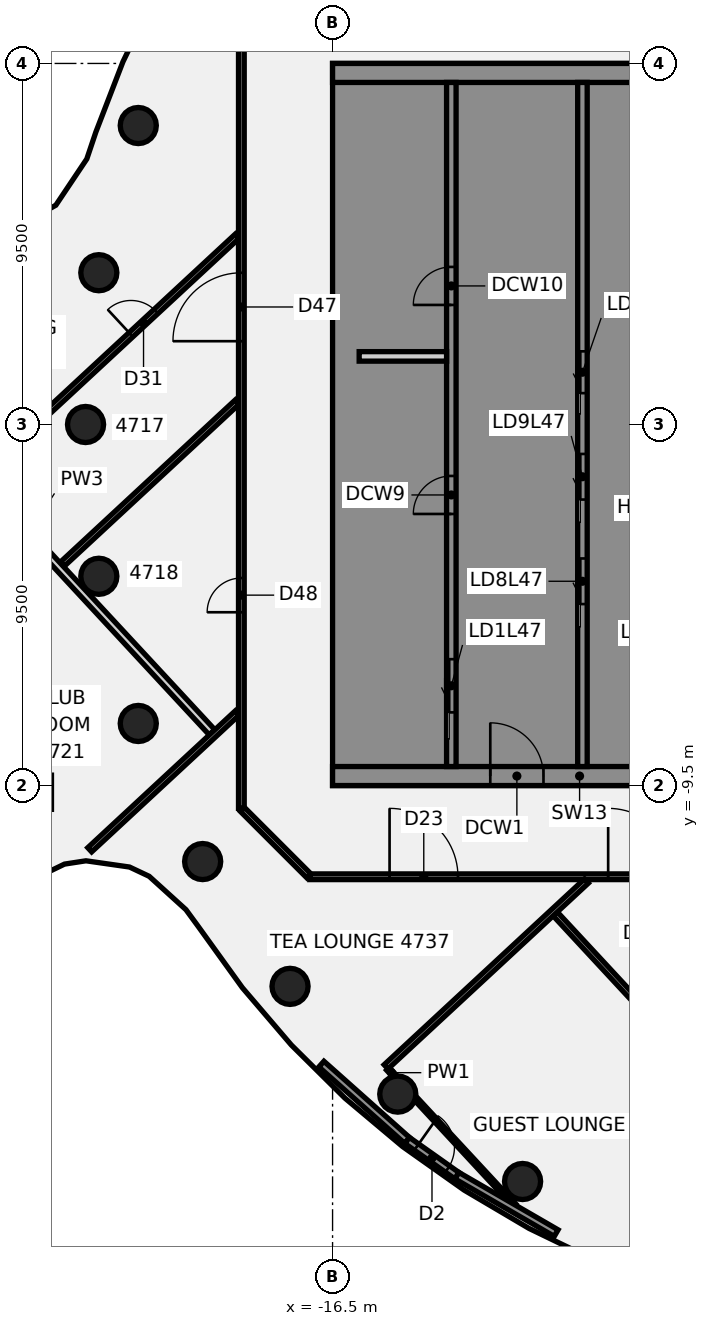
"""IFC4 building model, lengths in metres.
Left out: names, types, materials, properties, quantities, classifications, styles, units other than length and angle.
Written with IfcOpenShell. Run it as: python <this file> out.ifc"""

import sys

from ifc_helpers import new_model, si_unit, direction, frame, frame_2d, origin, origin_2d, place, context, subcontext, project, spatial, polyline, rectangle, circle, outline, extrude, element, fill, save


model = new_model("IFC4")
c1 = context("Model", 3, precision=1e-05, world=origin(), true_north=direction((0.0, 1.0)))
c2 = subcontext(c1, "Body", "Model", "MODEL_VIEW")
j1 = project(units=[si_unit("LENGTHUNIT", "METRE"), si_unit("PLANEANGLEUNIT", "RADIAN")], contexts=[c1])
p1 = place(None, origin())
s1 = spatial("IfcSite", under=j1, at=p1, CompositionType="ELEMENT")
p2 = place(p1, origin())
s2 = spatial("IfcBuilding", under=s1, at=p2, CompositionType="ELEMENT")
p3 = place(p2, frame((0.0, 0.0, 189.7)))
s3 = spatial("IfcBuildingStorey", under=s2, at=p3, CompositionType="ELEMENT", Elevation=189.7)
for number, where, z_axis, x_axis in (
    (1, (-21.613, 7.866, -0.14), (0.0, 0.0, 1.0), (1.0, 0.0, 0.0)),
    (2, (-22.651, 3.994, -0.14), (0.0, 0.0, 1.0), (1.0, 0.0, 0.0)),
    (3, (-23.0, 0.0, -0.14), (0.0, 0.0, 1.0), (1.0, 0.0, 0.0)),
    (4, (-22.651, -3.994, -0.14), (0.0, 0.0, 1.0), (1.0, 0.0, 0.0)),
    (5, (-21.613, -7.866, -0.14), (0.0, 0.0, 1.0), (1.0, 0.0, 0.0)),
    (6, (-19.919, -11.5, -0.14), (0.0, 0.0, 1.0), (1.0, 0.0, 0.0)),
    (7, (-17.619, -14.784, -0.14), (0.0, 0.0, 1.0), (1.0, 0.0, 0.0)),
    (8, (-14.784, -17.619, -0.14), (0.0, 0.0, 1.0), (1.0, 0.0, 0.0)),
    (9, (-11.5, -19.919, -0.14), (0.0, 0.0, 1.0), (1.0, 0.0, 0.0)),
):
    element("IfcColumn", number, at=place(p3, frame(where, z_axis=z_axis, x_axis=x_axis)), inside=s3, PredefinedType="COLUMN", context=c2, shape_type="SweptSolid", body=[
        extrude(circle(Radius=0.475, at=origin_2d()), origin(), (0.0, 0.0, 1.0), 3.6),
    ])
p4 = place(p3, frame((-24.347, -9.677, -0.139), z_axis=(0.049004711131, -0.011386986819, 0.99873363557), x_axis=(-0.679260584893, 0.732712476675, 0.041683142108)))
e10 = element("IfcColumn", 10, at=p4, inside=s3, PredefinedType="COLUMN", context=c2, shape_type="SweptSolid", body=[
    extrude(rectangle(XDim=0.9, YDim=0.9, at=origin_2d()), origin(), (0.0, 0.0, 1.0), 3.602),
])
p5 = place(p3, frame((-29.342, 2.328, 0.0), z_axis=(0.0, 0.0, 1.0), x_axis=(0.679974811844, -0.73323547054, 0.0)))
e11 = element("IfcWall", 11, at=p5, inside=s3, PredefinedType="PARTITIONING", context=c2, shape_type="SweptSolid", body=[
    extrude(rectangle(XDim=14.219, YDim=0.2, at=frame_2d((7.11, 0.0))), origin(), (0.0, 0.0, 1.0), 2.864),
])
p6 = place(p5, frame((5.8, 0.0, 0.0)))
e12 = element("IfcOpeningElement", 12, at=p6, cuts=e11, PredefinedType="OPENING", context=c2, shape_type="SweptSolid", body=[
    extrude(rectangle(XDim=1.4, YDim=2.1, at=frame_2d((0.7, 1.05))), frame((0.0, 0.11, 0.0), z_axis=(0.0, -1.0, 0.0), x_axis=(1.0, 0.0, 0.0)), (0.0, 0.0, 1.0), 0.22),
])
p7 = place(p3, frame((-15.041, -16.956, 0.0), z_axis=(0.0, 0.0, 1.0), x_axis=(0.679895310154, -0.733309189381, 0.0)))
e13 = element("IfcWall", 13, at=p7, inside=s3, PredefinedType="PARTITIONING", context=c2, shape_type="SweptSolid", body=[
    extrude(rectangle(XDim=0.27, YDim=0.1, at=frame_2d((0.135, 0.0))), origin(), (0.0, 0.0, 1.0), 2.864),
])
p8 = place(p3, frame((-14.328, -17.725, 0.0), z_axis=(0.0, 0.0, 1.0), x_axis=(0.679978080858, -0.733232438966, 0.0)))
e14 = element("IfcWall", 14, at=p8, inside=s3, PredefinedType="PARTITIONING", context=c2, shape_type="SweptSolid", body=[
    extrude(rectangle(XDim=3.842, YDim=0.1, at=frame_2d((1.921, 0.0))), origin(), (0.0, 0.0, 1.0), 2.864),
])
p9 = place(p3, frame((-10.638, -12.881, 0.0), z_axis=(0.0, 0.0, 1.0), x_axis=(0.679925356206, -0.733281330724, 0.0)))
e15 = element("IfcWall", 15, at=p9, inside=s3, PredefinedType="PARTITIONING", context=c2, shape_type="SweptSolid", body=[
    extrude(rectangle(XDim=17.639, YDim=0.15, at=frame_2d((8.82, 0.0))), origin(), (0.0, 0.0, 1.0), 2.864),
])
p10 = place(p9, frame((7.87, 0.0, 0.0)))
e16 = element("IfcOpeningElement", 16, at=p10, cuts=e15, PredefinedType="OPENING", context=c2, shape_type="SweptSolid", body=[
    extrude(rectangle(XDim=1.8, YDim=2.1, at=frame_2d((0.9, 1.05))), frame((0.0, 0.085, 0.0), z_axis=(0.0, -1.0, 0.0), x_axis=(1.0, 0.0, 0.0)), (0.0, 0.0, 1.0), 0.17),
])
p11 = place(p3, frame((-18.872, -10.128, 0.0), z_axis=(0.0, 0.0, 1.0), x_axis=(0.707106781187, -0.707106781187, 0.0)))
e17 = element("IfcWall", 17, at=p11, inside=s3, PredefinedType="PARTITIONING", context=c2, shape_type="SweptSolid", body=[
    extrude(rectangle(XDim=2.465, YDim=0.15, at=frame_2d((1.232, 0.0))), origin(), (0.0, 0.0, 1.0), 2.864),
])
p12 = place(p3, frame((-17.1, -11.9, 0.0), z_axis=(0.0, 0.0, 1.0), x_axis=(1.0, 0.0, 0.0)))
e18 = element("IfcWall", 18, at=p12, inside=s3, PredefinedType="PARTITIONING", context=c2, shape_type="SweptSolid", body=[
    extrude(rectangle(XDim=34.165, YDim=0.15, at=frame_2d((17.083, 0.0))), origin(), (0.0, 0.0, 1.0), 2.864),
])
p13 = place(p12, frame((7.852, 0.0, 0.0)))
e19 = element("IfcOpeningElement", 19, at=p13, cuts=e18, PredefinedType="OPENING", context=c2, shape_type="SweptSolid", body=[
    extrude(rectangle(XDim=1.8, YDim=2.1, at=frame_2d((0.9, 1.05))), frame((0.0, 0.085, 0.0), z_axis=(0.0, -1.0, 0.0), x_axis=(1.0, 0.0, 0.0)), (0.0, 0.0, 1.0), 0.17),
])
p14 = place(p12, frame((2.1, 0.0, 0.0)))
e20 = element("IfcOpeningElement", 20, at=p14, cuts=e18, PredefinedType="OPENING", context=c2, shape_type="SweptSolid", body=[
    extrude(rectangle(XDim=1.8, YDim=2.1, at=frame_2d((0.9, 1.05))), frame((0.0, 0.085, 0.0), z_axis=(0.0, -1.0, 0.0), x_axis=(1.0, 0.0, 0.0)), (0.0, 0.0, 1.0), 0.17),
])
p15 = place(p12, frame((25.149, 0.0, 0.0)))
e21 = element("IfcOpeningElement", 21, at=p15, cuts=e18, PredefinedType="OPENING", context=c2, shape_type="SweptSolid", body=[
    extrude(rectangle(XDim=1.8, YDim=2.1, at=frame_2d((0.9, 1.05))), frame((0.0, 0.085, 0.0), z_axis=(0.0, -1.0, 0.0), x_axis=(1.0, 0.0, 0.0)), (0.0, 0.0, 1.0), 0.17),
])
p16 = place(p3, frame((-25.801, -1.342, 0.0), z_axis=(0.0, 0.0, 1.0), x_axis=(0.733307567505, 0.679897059444, 0.0)))
e22 = element("IfcWall", 22, at=p16, inside=s3, PredefinedType="PARTITIONING", context=c2, shape_type="SweptSolid", body=[
    extrude(rectangle(XDim=9.265, YDim=0.15, at=frame_2d((4.633, 0.0))), origin(), (0.0, 0.0, 1.0), 2.864),
])
p17 = place(p16, frame((5.45, 0.0, 0.0)))
e23 = element("IfcOpeningElement", 23, at=p17, cuts=e22, PredefinedType="OPENING", context=c2, shape_type="SweptSolid", body=[
    extrude(rectangle(XDim=0.9, YDim=2.1, at=frame_2d((0.45, 1.05))), frame((0.0, 0.085, 0.0), z_axis=(0.0, -1.0, 0.0), x_axis=(1.0, 0.0, 0.0)), (0.0, 0.0, 1.0), 0.17),
])
p18 = place(p3, frame((-23.611, -3.675, 0.0), z_axis=(0.0, 0.0, 1.0), x_axis=(0.73335133344, 0.679849852351, 0.0)))
e24 = element("IfcWall", 24, at=p18, inside=s3, PredefinedType="PARTITIONING", context=c2, shape_type="SweptSolid", body=[
    extrude(rectangle(XDim=6.279, YDim=0.15, at=frame_2d((3.14, 0.0))), origin(), (0.0, 0.0, 1.0), 2.864),
])
p19 = place(p3, frame((-22.89, -11.19, 0.0), z_axis=(0.0, 0.0, 1.0), x_axis=(0.733248099132, 0.679961193833, 0.0)))
e25 = element("IfcWall", 25, at=p19, inside=s3, PredefinedType="PARTITIONING", context=c2, shape_type="SweptSolid", body=[
    extrude(rectangle(XDim=5.296, YDim=0.15, at=frame_2d((2.648, 0.0))), origin(), (0.0, 0.0, 1.0), 2.864),
])
p20 = place(p3, frame((-15.092, -16.901, 0.0), z_axis=(0.0, 0.0, 1.0), x_axis=(0.733371254751, 0.67982836268, 0.0)))
e26 = element("IfcWall", 26, at=p20, inside=s3, PredefinedType="PARTITIONING", context=c2, shape_type="SweptSolid", body=[
    extrude(rectangle(XDim=7.191, YDim=0.15, at=frame_2d((3.595, 0.0))), origin(), (0.0, 0.0, 1.0), 2.864),
])
p21 = place(p3, frame((-18.9, -10.1, 0.0), z_axis=(0.0, 0.0, 1.0), x_axis=(0.0, 1.0, 0.0)))
e27 = element("IfcWall", 27, at=p21, inside=s3, PredefinedType="PARTITIONING", context=c2, shape_type="SweptSolid", body=[
    extrude(rectangle(XDim=20.2, YDim=0.15, at=frame_2d((10.1, 0.0))), origin(), (0.0, 0.0, 1.0), 2.864),
])
p22 = place(p21, frame((12.292, 0.0, 0.0)))
e28 = element("IfcOpeningElement", 28, at=p22, cuts=e27, PredefinedType="OPENING", context=c2, shape_type="SweptSolid", body=[
    extrude(rectangle(XDim=1.8, YDim=2.1, at=frame_2d((0.9, 1.05))), frame((0.0, 0.085, 0.0), z_axis=(0.0, -1.0, 0.0), x_axis=(1.0, 0.0, 0.0)), (0.0, 0.0, 1.0), 0.17),
])
p23 = place(p21, frame((5.16, 0.0, 0.0)))
e29 = element("IfcOpeningElement", 29, at=p23, cuts=e27, PredefinedType="OPENING", context=c2, shape_type="SweptSolid", body=[
    extrude(rectangle(XDim=0.9, YDim=2.1, at=frame_2d((0.45, 1.05))), frame((0.0, 0.085, 0.0), z_axis=(0.0, -1.0, 0.0), x_axis=(1.0, 0.0, 0.0)), (0.0, 0.0, 1.0), 0.17),
])
p24 = place(p3, frame((-16.794, -16.83, 0.0), z_axis=(0.0, 0.0, 1.0), x_axis=(0.746918793399, -0.664915269841, 0.0)))
e30 = element("IfcWall", 30, at=p24, inside=s3, PredefinedType="SOLIDWALL", context=c2, shape_type="SweptSolid", body=[
    extrude(rectangle(XDim=3.022, YDim=0.2, at=frame_2d((1.511, 0.0))), origin(), (0.0, 0.0, 1.0), 3.46),
])
p25 = place(p3, frame((-13.231, -19.763, 0.0), z_axis=(0.0, 0.0, 1.0), x_axis=(0.865619895442, -0.500701704226, 0.0)))
e31 = element("IfcWall", 31, at=p25, inside=s3, PredefinedType="SOLIDWALL", context=c2, shape_type="SweptSolid", body=[
    extrude(rectangle(XDim=3.021, YDim=0.2, at=frame_2d((1.51, 0.0))), origin(), (0.0, 0.0, 1.0), 3.46),
])
p26 = place(p3, frame((-14.537, -18.839, 0.0), z_axis=(0.0, 0.0, 1.0), x_axis=(0.816282280001, -0.577653217212, 0.0)))
e32 = element("IfcWall", 32, at=p26, inside=s3, PredefinedType="SOLIDWALL", context=c2, shape_type="SweptSolid", body=[
    extrude(rectangle(XDim=1.6, YDim=0.2, at=frame_2d((0.8, 0.0))), origin(), (0.0, 0.0, 1.0), 3.46),
])
p27 = place(p26, frame((0.3, 0.0, 0.0)))
e33 = element("IfcOpeningElement", 33, at=p27, cuts=e32, PredefinedType="OPENING", context=c2, shape_type="SweptSolid", body=[
    extrude(rectangle(XDim=1.0, YDim=2.4, at=frame_2d((0.5, 1.2))), frame((0.0, 0.11, 0.0), z_axis=(0.0, -1.0, 0.0), x_axis=(1.0, 0.0, 0.0)), (0.0, 0.0, 1.0), 0.22),
])
p28 = place(p3, frame((-16.5, -9.25, 0.0), z_axis=(0.0, 0.0, 1.0), x_axis=(1.0, 0.0, 0.0)))
e34 = element("IfcWall", 34, at=p28, inside=s3, PredefinedType="SHEAR", context=c2, shape_type="SweptSolid", body=[
    extrude(rectangle(XDim=13.0, YDim=0.5, at=frame_2d((6.5, 0.0))), origin(), (0.0, 0.0, 1.0), 3.46),
])
p29 = place(p28, frame((4.15, 0.0, 0.0)))
e35 = element("IfcOpeningElement", 35, at=p29, cuts=e34, PredefinedType="OPENING", context=c2, shape_type="SweptSolid", body=[
    extrude(rectangle(XDim=1.4, YDim=2.1, at=frame_2d((0.7, 1.05))), frame((0.0, 0.26, 0.0), z_axis=(0.0, -1.0, 0.0), x_axis=(1.0, 0.0, 0.0)), (0.0, 0.0, 1.0), 0.52),
])
p30 = place(p28, frame((10.125, 0.0, 0.0)))
e36 = element("IfcOpeningElement", 36, at=p30, cuts=e34, PredefinedType="OPENING", context=c2, shape_type="SweptSolid", body=[
    extrude(rectangle(XDim=1.4, YDim=2.1, at=frame_2d((0.7, 1.05))), frame((0.0, 0.26, 0.0), z_axis=(0.0, -1.0, 0.0), x_axis=(1.0, 0.0, 0.0)), (0.0, 0.0, 1.0), 0.52),
])
p31 = place(p3, origin())
e37 = element("IfcWall", 37, at=p31, inside=s3, PredefinedType="SHEAR", context=c2, shape_type="SweptSolid", body=[
    extrude(outline(polyline([(-13.5, -8.125), (-16.0, -8.125), (-16.0, -5.625), (-13.5, -5.625), (-13.5, -5.375), (-16.0, -5.375), (-16.0, 5.375), (-13.5, 5.375), (-13.5, 5.625), (-16.0, 5.625), (-16.0, 8.125), (-13.5, 8.125), (-13.5, 9.0), (-16.0, 9.0), (-16.5, 9.0), (-16.5, -9.0), (-16.0, -9.0), (-13.5, -9.0), (-13.5, -8.125)])), origin(), (0.0, 0.0, 1.0), 3.46),
])
p32 = place(p3, frame((-16.5, 9.25, 0.0), z_axis=(0.0, 0.0, 1.0), x_axis=(1.0, 0.0, 0.0)))
e38 = element("IfcWall", 38, at=p32, inside=s3, PredefinedType="SHEAR", context=c2, shape_type="SweptSolid", body=[
    extrude(rectangle(XDim=13.0, YDim=0.5, at=frame_2d((6.5, 0.0))), origin(), (0.0, 0.0, 1.0), 3.46),
])
p33 = place(p3, origin())
e39 = element("IfcWall", 39, at=p33, inside=s3, PredefinedType="SHEAR", context=c2, shape_type="SweptSolid", body=[
    extrude(outline(polyline([(-9.8, -5.375), (-9.8, -5.625), (-7.5, -5.625), (-7.25, -5.625), (-7.25, 9.0), (-7.5, 9.0), (-9.8, 9.0), (-9.8, 8.125), (-7.5, 8.125), (-7.5, 5.625), (-9.8, 5.625), (-9.8, 5.375), (-7.5, 5.375), (-7.5, 2.875), (-9.8, 2.875), (-9.8, 2.625), (-7.5, 2.625), (-7.5, 0.125), (-9.8, 0.125), (-9.8, -0.125), (-7.5, -0.125), (-7.5, -2.625), (-9.8, -2.625), (-9.8, -2.875), (-7.5, -2.875), (-7.5, -5.375), (-9.8, -5.375)])), origin(), (0.0, 0.0, 1.0), 3.46),
])
p34 = place(p3, origin())
e40 = element("IfcWall", 40, at=p34, inside=s3, PredefinedType="SHEAR", context=c2, shape_type="SweptSolid", body=[
    extrude(outline(polyline([(-7.5, -8.125), (-9.55, -8.125), (-9.55, -5.625), (-9.8, -5.625), (-9.8, -8.125), (-9.8, -9.0), (-7.5, -9.0), (-7.5, -8.125)])), origin(), (0.0, 0.0, 1.0), 3.46),
])
p35 = place(p3, frame((-13.375, -9.0, 0.0), z_axis=(0.0, 0.0, 1.0), x_axis=(0.0, 1.0, 0.0)))
e41 = element("IfcWall", 41, at=p35, inside=s3, PredefinedType="SHEAR", context=c2, shape_type="SweptSolid", body=[
    extrude(rectangle(XDim=18.0, YDim=0.25, at=frame_2d((9.0, 0.0))), origin(), (0.0, 0.0, 1.0), 3.46),
])
p36 = place(p35, frame((1.425, 0.0, 0.0)))
e42 = element("IfcOpeningElement", 42, at=p36, cuts=e41, PredefinedType="OPENING", context=c2, shape_type="SweptSolid", body=[
    extrude(rectangle(XDim=1.4, YDim=2.1, at=frame_2d((0.7, 1.05))), frame((0.0, 0.135, 0.0), z_axis=(0.0, -1.0, 0.0), x_axis=(1.0, 0.0, 0.0)), (0.0, 0.0, 1.0), 0.27),
])
p37 = place(p35, frame((6.646, 0.0, 0.0)))
e43 = element("IfcOpeningElement", 43, at=p37, cuts=e41, PredefinedType="OPENING", context=c2, shape_type="SweptSolid", body=[
    extrude(rectangle(XDim=1.0, YDim=2.1, at=frame_2d((0.5, 1.05))), frame((0.0, 0.135, 0.0), z_axis=(0.0, -1.0, 0.0), x_axis=(1.0, 0.0, 0.0)), (0.0, 0.0, 1.0), 0.27),
])
p38 = place(p35, frame((12.146, 0.0, 0.0)))
e44 = element("IfcOpeningElement", 44, at=p38, cuts=e41, PredefinedType="OPENING", context=c2, shape_type="SweptSolid", body=[
    extrude(rectangle(XDim=1.0, YDim=2.1, at=frame_2d((0.5, 1.05))), frame((0.0, 0.135, 0.0), z_axis=(0.0, -1.0, 0.0), x_axis=(1.0, 0.0, 0.0)), (0.0, 0.0, 1.0), 0.27),
])
p39 = place(p3, frame((-9.925, -9.0, 0.0), z_axis=(0.0, 0.0, 1.0), x_axis=(0.0, 1.0, 0.0)))
e45 = element("IfcWall", 45, at=p39, inside=s3, PredefinedType="SHEAR", context=c2, shape_type="SweptSolid", body=[
    extrude(rectangle(XDim=18.0, YDim=0.25, at=frame_2d((9.0, 0.0))), origin(), (0.0, 0.0, 1.0), 3.46),
])
p40 = place(p39, frame((4.275, 0.0, 0.0)))
e46 = element("IfcOpeningElement", 46, at=p40, cuts=e45, PredefinedType="OPENING", context=c2, shape_type="SweptSolid", body=[
    extrude(rectangle(XDim=1.2, YDim=2.1, at=frame_2d((0.6, 1.05))), frame((0.0, 0.135, 0.0), z_axis=(0.0, -1.0, 0.0), x_axis=(1.0, 0.0, 0.0)), (0.0, 0.0, 1.0), 0.27),
])
p41 = place(p39, frame((7.025, 0.0, 0.0)))
e47 = element("IfcOpeningElement", 47, at=p41, cuts=e45, PredefinedType="OPENING", context=c2, shape_type="SweptSolid", body=[
    extrude(rectangle(XDim=1.2, YDim=2.1, at=frame_2d((0.6, 1.05))), frame((0.0, 0.135, 0.0), z_axis=(0.0, -1.0, 0.0), x_axis=(1.0, 0.0, 0.0)), (0.0, 0.0, 1.0), 0.27),
])
p42 = place(p39, frame((9.825, 0.0, 0.0)))
e48 = element("IfcOpeningElement", 48, at=p42, cuts=e45, PredefinedType="OPENING", context=c2, shape_type="SweptSolid", body=[
    extrude(rectangle(XDim=1.1, YDim=2.1, at=frame_2d((0.55, 1.05))), frame((0.0, 0.135, 0.0), z_axis=(0.0, -1.0, 0.0), x_axis=(1.0, 0.0, 0.0)), (0.0, 0.0, 1.0), 0.27),
])
p43 = place(p3, frame((-15.8, 1.792, 0.0), z_axis=(0.0, 0.0, 1.0), x_axis=(1.0, 0.0, 0.0)))
e49 = element("IfcWall", 49, at=p43, inside=s3, PredefinedType="PARTITIONING", context=c2, shape_type="SweptSolid", body=[
    extrude(rectangle(XDim=2.3, YDim=0.25, at=frame_2d((1.15, 0.0))), origin(), (0.0, 0.0, 1.0), 3.46),
])
p44 = place(p13, origin())
e50 = element("IfcDoor", 50, at=p44, inside=s3, OperationType="DOUBLE_DOOR_SINGLE_SWING", PredefinedType="DOOR", context=c2, shape_type="SweptSolid", body=[
    extrude(rectangle(XDim=1.8, YDim=2.1, at=frame_2d((0.9, 1.05))), frame((0.0, 0.025, 0.0), z_axis=(0.0, -1.0, 0.0), x_axis=(1.0, 0.0, 0.0)), (0.0, 0.0, 1.0), 0.05),
])
fill(e19, e50)
p45 = place(p14, frame((1.8, 0.0, 0.0), z_axis=(0.0, 0.0, 1.0), x_axis=(-1.0, 0.0, 0.0)))
e51 = element("IfcDoor", 51, at=p45, inside=s3, OperationType="DOUBLE_DOOR_SINGLE_SWING", PredefinedType="DOOR", context=c2, shape_type="SweptSolid", body=[
    extrude(rectangle(XDim=1.8, YDim=2.1, at=frame_2d((0.9, 1.05))), frame((0.0, 0.025, 0.0), z_axis=(0.0, -1.0, 0.0), x_axis=(1.0, 0.0, 0.0)), (0.0, 0.0, 1.0), 0.05),
])
fill(e20, e51)
p46 = place(p17, origin())
e52 = element("IfcDoor", 52, at=p46, inside=s3, OperationType="SINGLE_SWING_LEFT", PredefinedType="DOOR", context=c2, shape_type="SweptSolid", body=[
    extrude(rectangle(XDim=0.9, YDim=2.1, at=frame_2d((0.45, 1.05))), frame((0.0, 0.025, 0.0), z_axis=(0.0, -1.0, 0.0), x_axis=(1.0, 0.0, 0.0)), (0.0, 0.0, 1.0), 0.05),
])
fill(e23, e52)
p47 = place(p22, frame((1.8, 0.0, 0.0), z_axis=(0.0, 0.0, 1.0), x_axis=(-1.0, 0.0, 0.0)))
e53 = element("IfcDoor", 53, at=p47, inside=s3, OperationType="DOUBLE_DOOR_SINGLE_SWING", PredefinedType="DOOR", context=c2, shape_type="SweptSolid", body=[
    extrude(rectangle(XDim=1.8, YDim=2.1, at=frame_2d((0.9, 1.05))), frame((0.0, 0.025, 0.0), z_axis=(0.0, -1.0, 0.0), x_axis=(1.0, 0.0, 0.0)), (0.0, 0.0, 1.0), 0.05),
])
fill(e28, e53)
p48 = place(p23, origin())
e54 = element("IfcDoor", 54, at=p48, inside=s3, OperationType="SINGLE_SWING_RIGHT", PredefinedType="DOOR", context=c2, shape_type="SweptSolid", body=[
    extrude(rectangle(XDim=0.9, YDim=2.1, at=frame_2d((0.45, 1.05))), frame((0.0, 0.025, 0.0), z_axis=(0.0, -1.0, 0.0), x_axis=(1.0, 0.0, 0.0)), (0.0, 0.0, 1.0), 0.05),
])
fill(e29, e54)
p49 = place(p27, origin())
e55 = element("IfcDoor", 55, at=p49, inside=s3, OperationType="SINGLE_SWING_LEFT", PredefinedType="DOOR", context=c2, shape_type="SweptSolid", body=[
    extrude(rectangle(XDim=1.0, YDim=2.4, at=frame_2d((0.5, 1.2))), frame((0.0, 0.025, 0.0), z_axis=(0.0, -1.0, 0.0), x_axis=(1.0, 0.0, 0.0)), (0.0, 0.0, 1.0), 0.05),
])
fill(e33, e55)
p50 = place(p29, origin())
e56 = element("IfcDoor", 56, at=p50, inside=s3, OperationType="SINGLE_SWING_LEFT", PredefinedType="DOOR", context=c2, shape_type="SweptSolid", body=[
    extrude(rectangle(XDim=1.4, YDim=2.1, at=frame_2d((0.7, 1.05))), frame((0.0, 0.025, 0.0), z_axis=(0.0, -1.0, 0.0), x_axis=(1.0, 0.0, 0.0)), (0.0, 0.0, 1.0), 0.05),
])
fill(e35, e56)
p51 = place(p36, origin())
e57 = element("IfcDoor", 57, at=p51, inside=s3, OperationType="SLIDING_TO_LEFT", PredefinedType="DOOR", context=c2, shape_type="SweptSolid", body=[
    extrude(rectangle(XDim=1.4, YDim=2.1, at=frame_2d((0.7, 1.05))), frame((0.0, 0.025, 0.0), z_axis=(0.0, -1.0, 0.0), x_axis=(1.0, 0.0, 0.0)), (0.0, 0.0, 1.0), 0.05),
])
fill(e42, e57)
p52 = place(p40, origin())
e58 = element("IfcDoor", 58, at=p52, inside=s3, OperationType="SLIDING_TO_LEFT", PredefinedType="DOOR", context=c2, shape_type="SweptSolid", body=[
    extrude(rectangle(XDim=1.2, YDim=2.1, at=frame_2d((0.6, 1.05))), frame((0.0, 0.025, 0.0), z_axis=(0.0, -1.0, 0.0), x_axis=(1.0, 0.0, 0.0)), (0.0, 0.0, 1.0), 0.05),
])
fill(e46, e58)
p53 = place(p41, origin())
e59 = element("IfcDoor", 59, at=p53, inside=s3, OperationType="SLIDING_TO_LEFT", PredefinedType="DOOR", context=c2, shape_type="SweptSolid", body=[
    extrude(rectangle(XDim=1.2, YDim=2.1, at=frame_2d((0.6, 1.05))), frame((0.0, 0.025, 0.0), z_axis=(0.0, -1.0, 0.0), x_axis=(1.0, 0.0, 0.0)), (0.0, 0.0, 1.0), 0.05),
])
fill(e47, e59)
p54 = place(p42, origin())
e60 = element("IfcDoor", 60, at=p54, inside=s3, OperationType="SLIDING_TO_LEFT", PredefinedType="DOOR", context=c2, shape_type="SweptSolid", body=[
    extrude(rectangle(XDim=1.1, YDim=2.1, at=frame_2d((0.55, 1.05))), frame((0.0, 0.025, 0.0), z_axis=(0.0, -1.0, 0.0), x_axis=(1.0, 0.0, 0.0)), (0.0, 0.0, 1.0), 0.05),
])
fill(e48, e60)
p55 = place(p37, origin())
e61 = element("IfcDoor", 61, at=p55, inside=s3, OperationType="SINGLE_SWING_LEFT", PredefinedType="DOOR", context=c2, shape_type="SweptSolid", body=[
    extrude(rectangle(XDim=1.0, YDim=2.1, at=frame_2d((0.5, 1.05))), frame((0.0, 0.025, 0.0), z_axis=(0.0, -1.0, 0.0), x_axis=(1.0, 0.0, 0.0)), (0.0, 0.0, 1.0), 0.05),
])
fill(e43, e61)
p56 = place(p38, origin())
e62 = element("IfcDoor", 62, at=p56, inside=s3, OperationType="SINGLE_SWING_LEFT", PredefinedType="DOOR", context=c2, shape_type="SweptSolid", body=[
    extrude(rectangle(XDim=1.0, YDim=2.1, at=frame_2d((0.5, 1.05))), frame((0.0, 0.025, 0.0), z_axis=(0.0, -1.0, 0.0), x_axis=(1.0, 0.0, 0.0)), (0.0, 0.0, 1.0), 0.05),
])
fill(e44, e62)
save(model, sys.argv[1])
